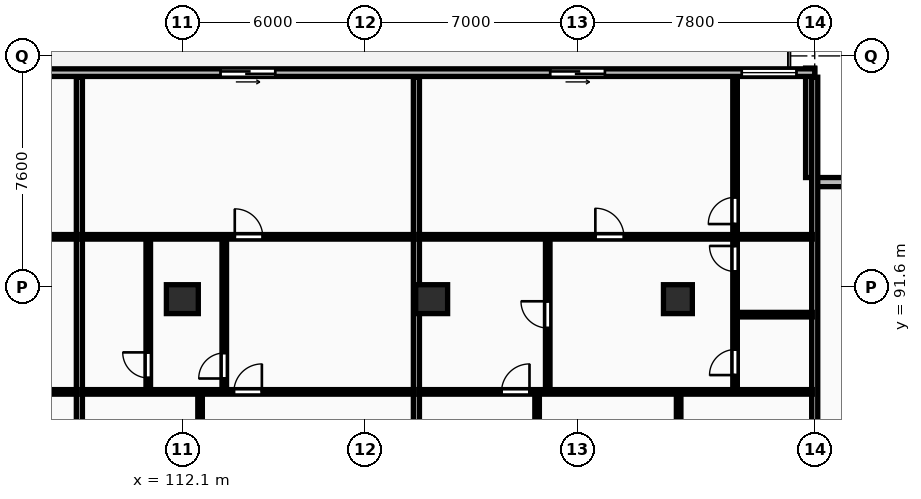
"""IFC4 building model, lengths in metres.
Left out: names, types, materials, properties, quantities, classifications, styles, units other than length and angle.
Written with IfcOpenShell. Run it as: python <this file> out.ifc"""

import sys

from ifc_helpers import new_model, si_unit, direction, frame, frame_2d, origin, origin_2d, place, context, subcontext, project, spatial, rectangle, circle, extrude, element, fill, save


model = new_model("IFC4")
c1 = context("Model", 3, precision=1e-05, world=origin(), true_north=direction((0.0, 1.0)))
c2 = subcontext(c1, "Body", "Model", "MODEL_VIEW")
j1 = project(units=[si_unit("LENGTHUNIT", "METRE"), si_unit("PLANEANGLEUNIT", "RADIAN")], contexts=[c1])
p1 = place(None, origin())
s1 = spatial("IfcSite", under=j1, at=p1, CompositionType="ELEMENT")
p2 = place(p1, origin())
s2 = spatial("IfcBuilding", under=s1, at=p2, CompositionType="ELEMENT")
p3 = place(p2, frame((0.0, 0.0, 24.0)))
s3 = spatial("IfcBuildingStorey", under=s2, at=p3, CompositionType="ELEMENT", Elevation=24.0)
for number, where, z_axis, x_axis in (
    (1, (112.1, 91.2, 0.0), (0.0, 0.0, 1.0), (1.0, 0.0, 0.0)),
    (2, (120.3, 91.2, 0.0), (0.0, 0.0, 1.0), (1.0, 0.0, 0.0)),
):
    element("IfcColumn", number, at=place(p3, frame(where, z_axis=z_axis, x_axis=x_axis)), inside=s3, PredefinedType="COLUMN", context=c2, shape_type="SweptSolid", body=[
        extrude(rectangle(XDim=1.05, YDim=0.95, at=origin_2d()), origin(), (0.0, 0.0, 1.0), 3.25),
    ])
p4 = place(p3, frame((128.4, 91.2, 0.0), z_axis=(0.0, 0.0, 1.0), x_axis=(1.0, 0.0, 0.0)))
e3 = element("IfcColumn", 3, at=p4, inside=s3, PredefinedType="COLUMN", context=c2, shape_type="SweptSolid", body=[
    extrude(circle(Radius=0.475, at=origin_2d()), origin(), (0.0, 0.0, 1.0), 3.25),
])
for number, where, z_axis, x_axis in (
    (4, (136.5, 95.05, 0.0), (0.0, 0.0, 1.0), (-1.0, 0.0, 0.0)),
    (5, (132.75, 95.2, 0.0), (0.0, 0.0, 1.0), (0.0, 1.0, 0.0)),
):
    element("IfcWall", number, at=place(p3, frame(where, z_axis=z_axis, x_axis=x_axis)), inside=s3, PredefinedType="STANDARD", context=c2, shape_type="SweptSolid", body=[
        extrude(rectangle(XDim=3.6, YDim=0.3, at=frame_2d((1.8, 0.0))), origin(), (0.0, 0.0, 1.0), 2.97),
    ])
p5 = place(p3, frame((132.9, 98.65, 0.0), z_axis=(0.0, 0.0, 1.0), x_axis=(-1.0, 0.0, 0.0)))
e6 = element("IfcWall", 6, at=p5, inside=s3, PredefinedType="STANDARD", context=c2, shape_type="SweptSolid", body=[
    extrude(rectangle(XDim=77.6, YDim=0.25, at=frame_2d((38.8, 0.0))), origin(), (0.0, 0.0, 1.0), 2.97),
])
p6 = place(p5, frame((71.661, 0.0, 0.0)))
e7 = element("IfcOpeningElement", 7, at=p6, cuts=e6, PredefinedType="OPENING", context=c2, shape_type="SweptSolid", body=[
    extrude(rectangle(XDim=1.8, YDim=2.2, at=frame_2d((0.9, 1.1))), frame((0.0, 0.135, 0.0), z_axis=(0.0, -1.0, 0.0), x_axis=(1.0, 0.0, 0.0)), (0.0, 0.0, 1.0), 0.27),
])
p7 = place(p5, frame((61.079, 0.0, 0.0)))
e8 = element("IfcOpeningElement", 8, at=p7, cuts=e6, PredefinedType="OPENING", context=c2, shape_type="SweptSolid", body=[
    extrude(rectangle(XDim=1.8, YDim=2.2, at=frame_2d((0.9, 1.1))), frame((0.0, 0.135, 0.0), z_axis=(0.0, -1.0, 0.0), x_axis=(1.0, 0.0, 0.0)), (0.0, 0.0, 1.0), 0.27),
])
p8 = place(p5, frame((50.498, 0.0, 0.0)))
e9 = element("IfcOpeningElement", 9, at=p8, cuts=e6, PredefinedType="OPENING", context=c2, shape_type="SweptSolid", body=[
    extrude(rectangle(XDim=1.8, YDim=2.2, at=frame_2d((0.9, 1.1))), frame((0.0, 0.135, 0.0), z_axis=(0.0, -1.0, 0.0), x_axis=(1.0, 0.0, 0.0)), (0.0, 0.0, 1.0), 0.27),
])
p9 = place(p5, frame((39.412, 0.0, 0.0)))
e10 = element("IfcOpeningElement", 10, at=p9, cuts=e6, PredefinedType="OPENING", context=c2, shape_type="SweptSolid", body=[
    extrude(rectangle(XDim=1.8, YDim=2.2, at=frame_2d((0.9, 1.1))), frame((0.0, 0.135, 0.0), z_axis=(0.0, -1.0, 0.0), x_axis=(1.0, 0.0, 0.0)), (0.0, 0.0, 1.0), 0.27),
])
p10 = place(p5, frame((28.326, 0.0, 0.0)))
e11 = element("IfcOpeningElement", 11, at=p10, cuts=e6, PredefinedType="OPENING", context=c2, shape_type="SweptSolid", body=[
    extrude(rectangle(XDim=1.8, YDim=2.2, at=frame_2d((0.9, 1.1))), frame((0.0, 0.135, 0.0), z_axis=(0.0, -1.0, 0.0), x_axis=(1.0, 0.0, 0.0)), (0.0, 0.0, 1.0), 0.27),
])
p11 = place(p5, frame((17.744, 0.0, 0.0)))
e12 = element("IfcOpeningElement", 12, at=p11, cuts=e6, PredefinedType="OPENING", context=c2, shape_type="SweptSolid", body=[
    extrude(rectangle(XDim=1.8, YDim=2.2, at=frame_2d((0.9, 1.1))), frame((0.0, 0.135, 0.0), z_axis=(0.0, -1.0, 0.0), x_axis=(1.0, 0.0, 0.0)), (0.0, 0.0, 1.0), 0.27),
])
p12 = place(p5, frame((6.901, 0.0, 0.0)))
e13 = element("IfcOpeningElement", 13, at=p12, cuts=e6, PredefinedType="OPENING", context=c2, shape_type="SweptSolid", body=[
    extrude(rectangle(XDim=1.8, YDim=2.2, at=frame_2d((0.9, 1.1))), frame((0.0, 0.135, 0.0), z_axis=(0.0, -1.0, 0.0), x_axis=(1.0, 0.0, 0.0)), (0.0, 0.0, 1.0), 0.27),
])
p13 = place(p5, frame((0.6, 0.0, 0.85)))
e14 = element("IfcOpeningElement", 14, at=p13, cuts=e6, PredefinedType="OPENING", context=c2, shape_type="SweptSolid", body=[
    extrude(rectangle(XDim=1.8, YDim=1.8, at=frame_2d((0.9, 0.9))), frame((0.0, 0.135, 0.0), z_axis=(0.0, -1.0, 0.0), x_axis=(1.0, 0.0, 0.0)), (0.0, 0.0, 1.0), 0.27),
])
for number, where, z_axis, x_axis in (
    (15, (132.9, 69.43, 0.0), (0.0, 0.0, 1.0), (0.0, 1.0, 0.0)),
    (16, (108.713, 69.43, 0.0), (0.0, 0.0, 1.0), (0.0, 1.0, 0.0)),
):
    element("IfcWall", number, at=place(p3, frame(where, z_axis=z_axis, x_axis=x_axis)), inside=s3, PredefinedType="PARTITIONING", context=c2, shape_type="SweptSolid", body=[
        extrude(rectangle(XDim=29.07, YDim=0.2, at=frame_2d((14.535, 0.0))), origin(), (0.0, 0.0, 1.0), 2.97),
    ])
p14 = place(p3, frame((98.715, 88.15, 0.0), z_axis=(0.0, 0.0, 1.0), x_axis=(1.0, 0.0, 0.0)))
e17 = element("IfcWall", 17, at=p14, inside=s3, PredefinedType="PARTITIONING", context=c2, shape_type="SweptSolid", body=[
    extrude(rectangle(XDim=9.918, YDim=0.15, at=frame_2d((4.959, 0.0))), origin(), (0.0, 0.0, 1.0), 2.97),
])
p15 = place(p14, frame((4.499, 0.0, 0.0)))
e18 = element("IfcOpeningElement", 18, at=p15, cuts=e17, PredefinedType="OPENING", context=c2, shape_type="SweptSolid", body=[
    extrude(rectangle(XDim=0.92, YDim=2.08, at=frame_2d((0.46, 1.04))), frame((0.0, 0.085, 0.0), z_axis=(0.0, -1.0, 0.0), x_axis=(1.0, 0.0, 0.0)), (0.0, 0.0, 1.0), 0.17),
])
p16 = place(p3, frame((98.715, 93.25, 0.0), z_axis=(0.0, 0.0, 1.0), x_axis=(1.0, 0.0, 0.0)))
e19 = element("IfcWall", 19, at=p16, inside=s3, PredefinedType="PARTITIONING", context=c2, shape_type="SweptSolid", body=[
    extrude(rectangle(XDim=9.918, YDim=0.15, at=frame_2d((4.959, 0.0))), origin(), (0.0, 0.0, 1.0), 2.97),
])
p17 = place(p16, frame((5.936, 0.0, 0.0)))
e20 = element("IfcOpeningElement", 20, at=p17, cuts=e19, PredefinedType="OPENING", context=c2, shape_type="SweptSolid", body=[
    extrude(rectangle(XDim=0.92, YDim=2.08, at=frame_2d((0.46, 1.04))), frame((0.0, 0.085, 0.0), z_axis=(0.0, -1.0, 0.0), x_axis=(1.0, 0.0, 0.0)), (0.0, 0.0, 1.0), 0.17),
])
p18 = place(p3, frame((119.799, 69.43, 0.0), z_axis=(0.0, 0.0, 1.0), x_axis=(0.0, 1.0, 0.0)))
e21 = element("IfcWall", 21, at=p18, inside=s3, PredefinedType="PARTITIONING", context=c2, shape_type="SweptSolid", body=[
    extrude(rectangle(XDim=29.07, YDim=0.2, at=frame_2d((14.535, 0.0))), origin(), (0.0, 0.0, 1.0), 2.97),
])
p19 = place(p3, frame((112.683, 69.41, 0.0), z_axis=(0.0, 0.0, 1.0), x_axis=(0.0, 1.0, 0.0)))
e22 = element("IfcWall", 22, at=p19, inside=s3, PredefinedType="PARTITIONING", context=c2, shape_type="SweptSolid", body=[
    extrude(rectangle(XDim=18.7, YDim=0.15, at=frame_2d((9.35, 0.0))), origin(), (0.0, 0.0, 1.0), 2.97),
])
p20 = place(p19, frame((7.579, 0.0, 0.0)))
e23 = element("IfcOpeningElement", 23, at=p20, cuts=e22, PredefinedType="OPENING", context=c2, shape_type="SweptSolid", body=[
    extrude(rectangle(XDim=0.88, YDim=2.06, at=frame_2d((0.44, 1.03))), frame((0.0, 0.085, 0.0), z_axis=(0.0, -1.0, 0.0), x_axis=(1.0, 0.0, 0.0)), (0.0, 0.0, 1.0), 0.17),
])
p21 = place(p3, frame((110.979, 88.19, 0.0), z_axis=(0.0, 0.0, 1.0), x_axis=(0.0, 1.0, 0.0)))
e24 = element("IfcWall", 24, at=p21, inside=s3, PredefinedType="PARTITIONING", context=c2, shape_type="SweptSolid", body=[
    extrude(rectangle(XDim=5.0, YDim=0.15, at=frame_2d((2.5, 0.0))), origin(), (0.0, 0.0, 1.0), 2.97),
])
p22 = place(p21, frame((0.419, 0.0, 0.0)))
e25 = element("IfcOpeningElement", 25, at=p22, cuts=e24, PredefinedType="OPENING", context=c2, shape_type="SweptSolid", body=[
    extrude(rectangle(XDim=0.84, YDim=2.04, at=frame_2d((0.42, 1.02))), frame((0.0, 0.085, 0.0), z_axis=(0.0, -1.0, 0.0), x_axis=(1.0, 0.0, 0.0)), (0.0, 0.0, 1.0), 0.17),
])
p23 = place(p3, frame((113.479, 88.19, 0.0), z_axis=(0.0, 0.0, 1.0), x_axis=(0.0, 1.0, 0.0)))
e26 = element("IfcWall", 26, at=p23, inside=s3, PredefinedType="PARTITIONING", context=c2, shape_type="SweptSolid", body=[
    extrude(rectangle(XDim=5.0, YDim=0.15, at=frame_2d((2.5, 0.0))), origin(), (0.0, 0.0, 1.0), 2.97),
])
p24 = place(p23, frame((0.4, 0.0, 0.0)))
e27 = element("IfcOpeningElement", 27, at=p24, cuts=e26, PredefinedType="OPENING", context=c2, shape_type="SweptSolid", body=[
    extrude(rectangle(XDim=0.84, YDim=2.04, at=frame_2d((0.42, 1.02))), frame((0.0, 0.085, 0.0), z_axis=(0.0, -1.0, 0.0), x_axis=(1.0, 0.0, 0.0)), (0.0, 0.0, 1.0), 0.17),
])
p25 = place(p3, frame((108.793, 88.15, 0.0), z_axis=(0.0, 0.0, 1.0), x_axis=(1.0, 0.0, 0.0)))
e28 = element("IfcWall", 28, at=p25, inside=s3, PredefinedType="PARTITIONING", context=c2, shape_type="SweptSolid", body=[
    extrude(rectangle(XDim=10.926, YDim=0.15, at=frame_2d((5.463, 0.0))), origin(), (0.0, 0.0, 1.0), 2.97),
])
p26 = place(p25, frame((5.003, 0.0, 0.0)))
e29 = element("IfcOpeningElement", 29, at=p26, cuts=e28, PredefinedType="OPENING", context=c2, shape_type="SweptSolid", body=[
    extrude(rectangle(XDim=0.92, YDim=2.08, at=frame_2d((0.46, 1.04))), frame((0.0, 0.085, 0.0), z_axis=(0.0, -1.0, 0.0), x_axis=(1.0, 0.0, 0.0)), (0.0, 0.0, 1.0), 0.17),
])
p27 = place(p3, frame((108.793, 93.25, 0.0), z_axis=(0.0, 0.0, 1.0), x_axis=(1.0, 0.0, 0.0)))
e30 = element("IfcWall", 30, at=p27, inside=s3, PredefinedType="PARTITIONING", context=c2, shape_type="SweptSolid", body=[
    extrude(rectangle(XDim=10.926, YDim=0.15, at=frame_2d((5.463, 0.0))), origin(), (0.0, 0.0, 1.0), 2.97),
])
p28 = place(p27, frame((5.031, 0.0, 0.0)))
e31 = element("IfcOpeningElement", 31, at=p28, cuts=e30, PredefinedType="OPENING", context=c2, shape_type="SweptSolid", body=[
    extrude(rectangle(XDim=0.92, YDim=2.08, at=frame_2d((0.46, 1.04))), frame((0.0, 0.085, 0.0), z_axis=(0.0, -1.0, 0.0), x_axis=(1.0, 0.0, 0.0)), (0.0, 0.0, 1.0), 0.17),
])
p29 = place(p3, frame((128.424, 69.41, 0.0), z_axis=(0.0, 0.0, 1.0), x_axis=(0.0, 1.0, 0.0)))
e32 = element("IfcWall", 32, at=p29, inside=s3, PredefinedType="PARTITIONING", context=c2, shape_type="SweptSolid", body=[
    extrude(rectangle(XDim=18.7, YDim=0.15, at=frame_2d((9.35, 0.0))), origin(), (0.0, 0.0, 1.0), 2.22),
])
p30 = place(p29, frame((7.627, 0.0, 0.0)))
e33 = element("IfcOpeningElement", 33, at=p30, cuts=e32, PredefinedType="OPENING", context=c2, shape_type="SweptSolid", body=[
    extrude(rectangle(XDim=0.84, YDim=2.04, at=frame_2d((0.42, 1.02))), frame((0.0, 0.085, 0.0), z_axis=(0.0, -1.0, 0.0), x_axis=(1.0, 0.0, 0.0)), (0.0, 0.0, 1.0), 0.17),
])
p31 = place(p29, frame((11.961, 0.0, 0.0)))
e34 = element("IfcOpeningElement", 34, at=p31, cuts=e32, PredefinedType="OPENING", context=c2, shape_type="SweptSolid", body=[
    extrude(rectangle(XDim=0.88, YDim=2.06, at=frame_2d((0.44, 1.03))), frame((0.0, 0.085, 0.0), z_axis=(0.0, -1.0, 0.0), x_axis=(1.0, 0.0, 0.0)), (0.0, 0.0, 1.0), 0.17),
])
p32 = place(p3, frame((123.769, 69.41, 0.0), z_axis=(0.0, 0.0, 1.0), x_axis=(0.0, 1.0, 0.0)))
e35 = element("IfcWall", 35, at=p32, inside=s3, PredefinedType="PARTITIONING", context=c2, shape_type="SweptSolid", body=[
    extrude(rectangle(XDim=18.7, YDim=0.15, at=frame_2d((9.35, 0.0))), origin(), (0.0, 0.0, 1.0), 2.97),
])
p33 = place(p32, frame((8.22, 0.0, 0.0)))
e36 = element("IfcOpeningElement", 36, at=p33, cuts=e35, PredefinedType="OPENING", context=c2, shape_type="SweptSolid", body=[
    extrude(rectangle(XDim=0.88, YDim=2.06, at=frame_2d((0.44, 1.03))), frame((0.0, 0.085, 0.0), z_axis=(0.0, -1.0, 0.0), x_axis=(1.0, 0.0, 0.0)), (0.0, 0.0, 1.0), 0.17),
])
p34 = place(p3, frame((124.119, 88.19, 0.0), z_axis=(0.0, 0.0, 1.0), x_axis=(0.0, 1.0, 0.0)))
e37 = element("IfcWall", 37, at=p34, inside=s3, PredefinedType="PARTITIONING", context=c2, shape_type="SweptSolid", body=[
    extrude(rectangle(XDim=5.0, YDim=0.15, at=frame_2d((2.5, 0.0))), origin(), (0.0, 0.0, 1.0), 2.97),
])
p35 = place(p34, frame((2.06, 0.0, 0.0)))
e38 = element("IfcOpeningElement", 38, at=p35, cuts=e37, PredefinedType="OPENING", context=c2, shape_type="SweptSolid", body=[
    extrude(rectangle(XDim=0.88, YDim=2.06, at=frame_2d((0.44, 1.03))), frame((0.0, 0.085, 0.0), z_axis=(0.0, -1.0, 0.0), x_axis=(1.0, 0.0, 0.0)), (0.0, 0.0, 1.0), 0.17),
])
p36 = place(p3, frame((130.34, 90.69, 0.0), z_axis=(0.0, 0.0, 1.0), x_axis=(1.0, 0.0, 0.0)))
e39 = element("IfcWall", 39, at=p36, inside=s3, PredefinedType="PARTITIONING", context=c2, shape_type="SweptSolid", body=[
    extrude(rectangle(XDim=2.48, YDim=0.15, at=frame_2d((1.24, 0.0))), origin(), (0.0, 0.0, 1.0), 2.97),
])
p37 = place(p3, frame((130.28, 88.19, 0.0), z_axis=(0.0, 0.0, 1.0), x_axis=(0.0, 1.0, 0.0)))
e40 = element("IfcWall", 40, at=p37, inside=s3, PredefinedType="PARTITIONING", context=c2, shape_type="SweptSolid", body=[
    extrude(rectangle(XDim=10.31, YDim=0.15, at=frame_2d((5.155, 0.0))), origin(), (0.0, 0.0, 1.0), 2.97),
])
p38 = place(p37, frame((0.513, 0.0, 0.0)))
e41 = element("IfcOpeningElement", 41, at=p38, cuts=e40, PredefinedType="OPENING", context=c2, shape_type="SweptSolid", body=[
    extrude(rectangle(XDim=0.84, YDim=2.04, at=frame_2d((0.42, 1.02))), frame((0.0, 0.085, 0.0), z_axis=(0.0, -1.0, 0.0), x_axis=(1.0, 0.0, 0.0)), (0.0, 0.0, 1.0), 0.17),
])
p39 = place(p37, frame((3.92, 0.0, 0.0)))
e42 = element("IfcOpeningElement", 42, at=p39, cuts=e40, PredefinedType="OPENING", context=c2, shape_type="SweptSolid", body=[
    extrude(rectangle(XDim=0.84, YDim=2.04, at=frame_2d((0.42, 1.02))), frame((0.0, 0.085, 0.0), z_axis=(0.0, -1.0, 0.0), x_axis=(1.0, 0.0, 0.0)), (0.0, 0.0, 1.0), 0.17),
])
p40 = place(p37, frame((5.48, 0.0, 0.0)))
e43 = element("IfcOpeningElement", 43, at=p40, cuts=e40, PredefinedType="OPENING", context=c2, shape_type="SweptSolid", body=[
    extrude(rectangle(XDim=0.88, YDim=2.06, at=frame_2d((0.44, 1.03))), frame((0.0, 0.085, 0.0), z_axis=(0.0, -1.0, 0.0), x_axis=(1.0, 0.0, 0.0)), (0.0, 0.0, 1.0), 0.17),
])
p41 = place(p3, frame((119.879, 88.15, 0.0), z_axis=(0.0, 0.0, 1.0), x_axis=(1.0, 0.0, 0.0)))
e44 = element("IfcWall", 44, at=p41, inside=s3, PredefinedType="PARTITIONING", context=c2, shape_type="SweptSolid", body=[
    extrude(rectangle(XDim=12.941, YDim=0.15, at=frame_2d((6.471, 0.0))), origin(), (0.0, 0.0, 1.0), 2.97),
])
p42 = place(p41, frame((2.72, 0.0, 0.0)))
e45 = element("IfcOpeningElement", 45, at=p42, cuts=e44, PredefinedType="OPENING", context=c2, shape_type="SweptSolid", body=[
    extrude(rectangle(XDim=0.92, YDim=2.08, at=frame_2d((0.46, 1.04))), frame((0.0, 0.085, 0.0), z_axis=(0.0, -1.0, 0.0), x_axis=(1.0, 0.0, 0.0)), (0.0, 0.0, 1.0), 0.17),
])
p43 = place(p3, frame((119.879, 93.25, 0.0), z_axis=(0.0, 0.0, 1.0), x_axis=(1.0, 0.0, 0.0)))
e46 = element("IfcWall", 46, at=p43, inside=s3, PredefinedType="PARTITIONING", context=c2, shape_type="SweptSolid", body=[
    extrude(rectangle(XDim=12.941, YDim=0.15, at=frame_2d((6.471, 0.0))), origin(), (0.0, 0.0, 1.0), 2.97),
])
p44 = place(p43, frame((5.806, 0.0, 0.0)))
e47 = element("IfcOpeningElement", 47, at=p44, cuts=e46, PredefinedType="OPENING", context=c2, shape_type="SweptSolid", body=[
    extrude(rectangle(XDim=0.94, YDim=2.1, at=frame_2d((0.47, 1.05))), frame((0.0, 0.085, 0.0), z_axis=(0.0, -1.0, 0.0), x_axis=(1.0, 0.0, 0.0)), (0.0, 0.0, 1.0), 0.17),
])
p45 = place(p11, origin())
e48 = element("IfcDoor", 48, at=p45, inside=s3, OperationType="SLIDING_TO_LEFT", PredefinedType="DOOR", context=c2, shape_type="SweptSolid", body=[
    extrude(rectangle(XDim=1.8, YDim=2.2, at=frame_2d((0.9, 1.1))), frame((0.0, 0.025, 0.0), z_axis=(0.0, -1.0, 0.0), x_axis=(1.0, 0.0, 0.0)), (0.0, 0.0, 1.0), 0.05),
])
fill(e12, e48)
p46 = place(p12, origin())
e49 = element("IfcDoor", 49, at=p46, inside=s3, OperationType="SLIDING_TO_LEFT", PredefinedType="DOOR", context=c2, shape_type="SweptSolid", body=[
    extrude(rectangle(XDim=1.8, YDim=2.2, at=frame_2d((0.9, 1.1))), frame((0.0, 0.025, 0.0), z_axis=(0.0, -1.0, 0.0), x_axis=(1.0, 0.0, 0.0)), (0.0, 0.0, 1.0), 0.05),
])
fill(e13, e49)
p47 = place(p13, origin())
e50 = element("IfcWindow", 50, at=p47, inside=s3, PartitioningType="SINGLE_PANEL", PredefinedType="WINDOW", context=c2, shape_type="SweptSolid", body=[
    extrude(rectangle(XDim=1.8, YDim=1.8, at=frame_2d((0.9, 0.9))), frame((0.0, 0.03, 0.0), z_axis=(0.0, -1.0, 0.0), x_axis=(1.0, 0.0, 0.0)), (0.0, 0.0, 1.0), 0.06),
])
fill(e14, e50)
p48 = place(p22, origin())
e51 = element("IfcDoor", 51, at=p48, inside=s3, OperationType="SINGLE_SWING_RIGHT", PredefinedType="DOOR", context=c2, shape_type="SweptSolid", body=[
    extrude(rectangle(XDim=0.84, YDim=2.04, at=frame_2d((0.42, 1.02))), frame((0.0, 0.025, 0.0), z_axis=(0.0, -1.0, 0.0), x_axis=(1.0, 0.0, 0.0)), (0.0, 0.0, 1.0), 0.05),
])
fill(e25, e51)
p49 = place(p24, origin())
e52 = element("IfcDoor", 52, at=p49, inside=s3, OperationType="SINGLE_SWING_LEFT", PredefinedType="DOOR", context=c2, shape_type="SweptSolid", body=[
    extrude(rectangle(XDim=0.84, YDim=2.04, at=frame_2d((0.42, 1.02))), frame((0.0, 0.025, 0.0), z_axis=(0.0, -1.0, 0.0), x_axis=(1.0, 0.0, 0.0)), (0.0, 0.0, 1.0), 0.05),
])
fill(e27, e52)
p50 = place(p26, origin())
e53 = element("IfcDoor", 53, at=p50, inside=s3, OperationType="SINGLE_SWING_RIGHT", PredefinedType="DOOR", context=c2, shape_type="SweptSolid", body=[
    extrude(rectangle(XDim=0.92, YDim=2.08, at=frame_2d((0.46, 1.04))), frame((0.0, 0.025, 0.0), z_axis=(0.0, -1.0, 0.0), x_axis=(1.0, 0.0, 0.0)), (0.0, 0.0, 1.0), 0.05),
])
fill(e29, e53)
p51 = place(p28, origin())
e54 = element("IfcDoor", 54, at=p51, inside=s3, OperationType="SINGLE_SWING_LEFT", PredefinedType="DOOR", context=c2, shape_type="SweptSolid", body=[
    extrude(rectangle(XDim=0.92, YDim=2.08, at=frame_2d((0.46, 1.04))), frame((0.0, 0.025, 0.0), z_axis=(0.0, -1.0, 0.0), x_axis=(1.0, 0.0, 0.0)), (0.0, 0.0, 1.0), 0.05),
])
fill(e31, e54)
p52 = place(p35, origin())
e55 = element("IfcDoor", 55, at=p52, inside=s3, OperationType="SINGLE_SWING_RIGHT", PredefinedType="DOOR", context=c2, shape_type="SweptSolid", body=[
    extrude(rectangle(XDim=0.88, YDim=2.06, at=frame_2d((0.44, 1.03))), frame((0.0, 0.025, 0.0), z_axis=(0.0, -1.0, 0.0), x_axis=(1.0, 0.0, 0.0)), (0.0, 0.0, 1.0), 0.05),
])
fill(e38, e55)
p53 = place(p38, origin())
e56 = element("IfcDoor", 56, at=p53, inside=s3, OperationType="SINGLE_SWING_LEFT", PredefinedType="DOOR", context=c2, shape_type="SweptSolid", body=[
    extrude(rectangle(XDim=0.84, YDim=2.04, at=frame_2d((0.42, 1.02))), frame((0.0, 0.025, 0.0), z_axis=(0.0, -1.0, 0.0), x_axis=(1.0, 0.0, 0.0)), (0.0, 0.0, 1.0), 0.05),
])
fill(e41, e56)
p54 = place(p39, origin())
e57 = element("IfcDoor", 57, at=p54, inside=s3, OperationType="SINGLE_SWING_RIGHT", PredefinedType="DOOR", context=c2, shape_type="SweptSolid", body=[
    extrude(rectangle(XDim=0.84, YDim=2.04, at=frame_2d((0.42, 1.02))), frame((0.0, 0.025, 0.0), z_axis=(0.0, -1.0, 0.0), x_axis=(1.0, 0.0, 0.0)), (0.0, 0.0, 1.0), 0.05),
])
fill(e42, e57)
p55 = place(p40, origin())
e58 = element("IfcDoor", 58, at=p55, inside=s3, OperationType="SINGLE_SWING_LEFT", PredefinedType="DOOR", context=c2, shape_type="SweptSolid", body=[
    extrude(rectangle(XDim=0.88, YDim=2.06, at=frame_2d((0.44, 1.03))), frame((0.0, 0.025, 0.0), z_axis=(0.0, -1.0, 0.0), x_axis=(1.0, 0.0, 0.0)), (0.0, 0.0, 1.0), 0.05),
])
fill(e43, e58)
p56 = place(p42, origin())
e59 = element("IfcDoor", 59, at=p56, inside=s3, OperationType="SINGLE_SWING_RIGHT", PredefinedType="DOOR", context=c2, shape_type="SweptSolid", body=[
    extrude(rectangle(XDim=0.92, YDim=2.08, at=frame_2d((0.46, 1.04))), frame((0.0, 0.025, 0.0), z_axis=(0.0, -1.0, 0.0), x_axis=(1.0, 0.0, 0.0)), (0.0, 0.0, 1.0), 0.05),
])
fill(e45, e59)
p57 = place(p44, origin())
e60 = element("IfcDoor", 60, at=p57, inside=s3, OperationType="SINGLE_SWING_LEFT", PredefinedType="DOOR", context=c2, shape_type="SweptSolid", body=[
    extrude(rectangle(XDim=0.94, YDim=2.1, at=frame_2d((0.47, 1.05))), frame((0.0, 0.025, 0.0), z_axis=(0.0, -1.0, 0.0), x_axis=(1.0, 0.0, 0.0)), (0.0, 0.0, 1.0), 0.05),
])
fill(e47, e60)
save(model, sys.argv[1])
